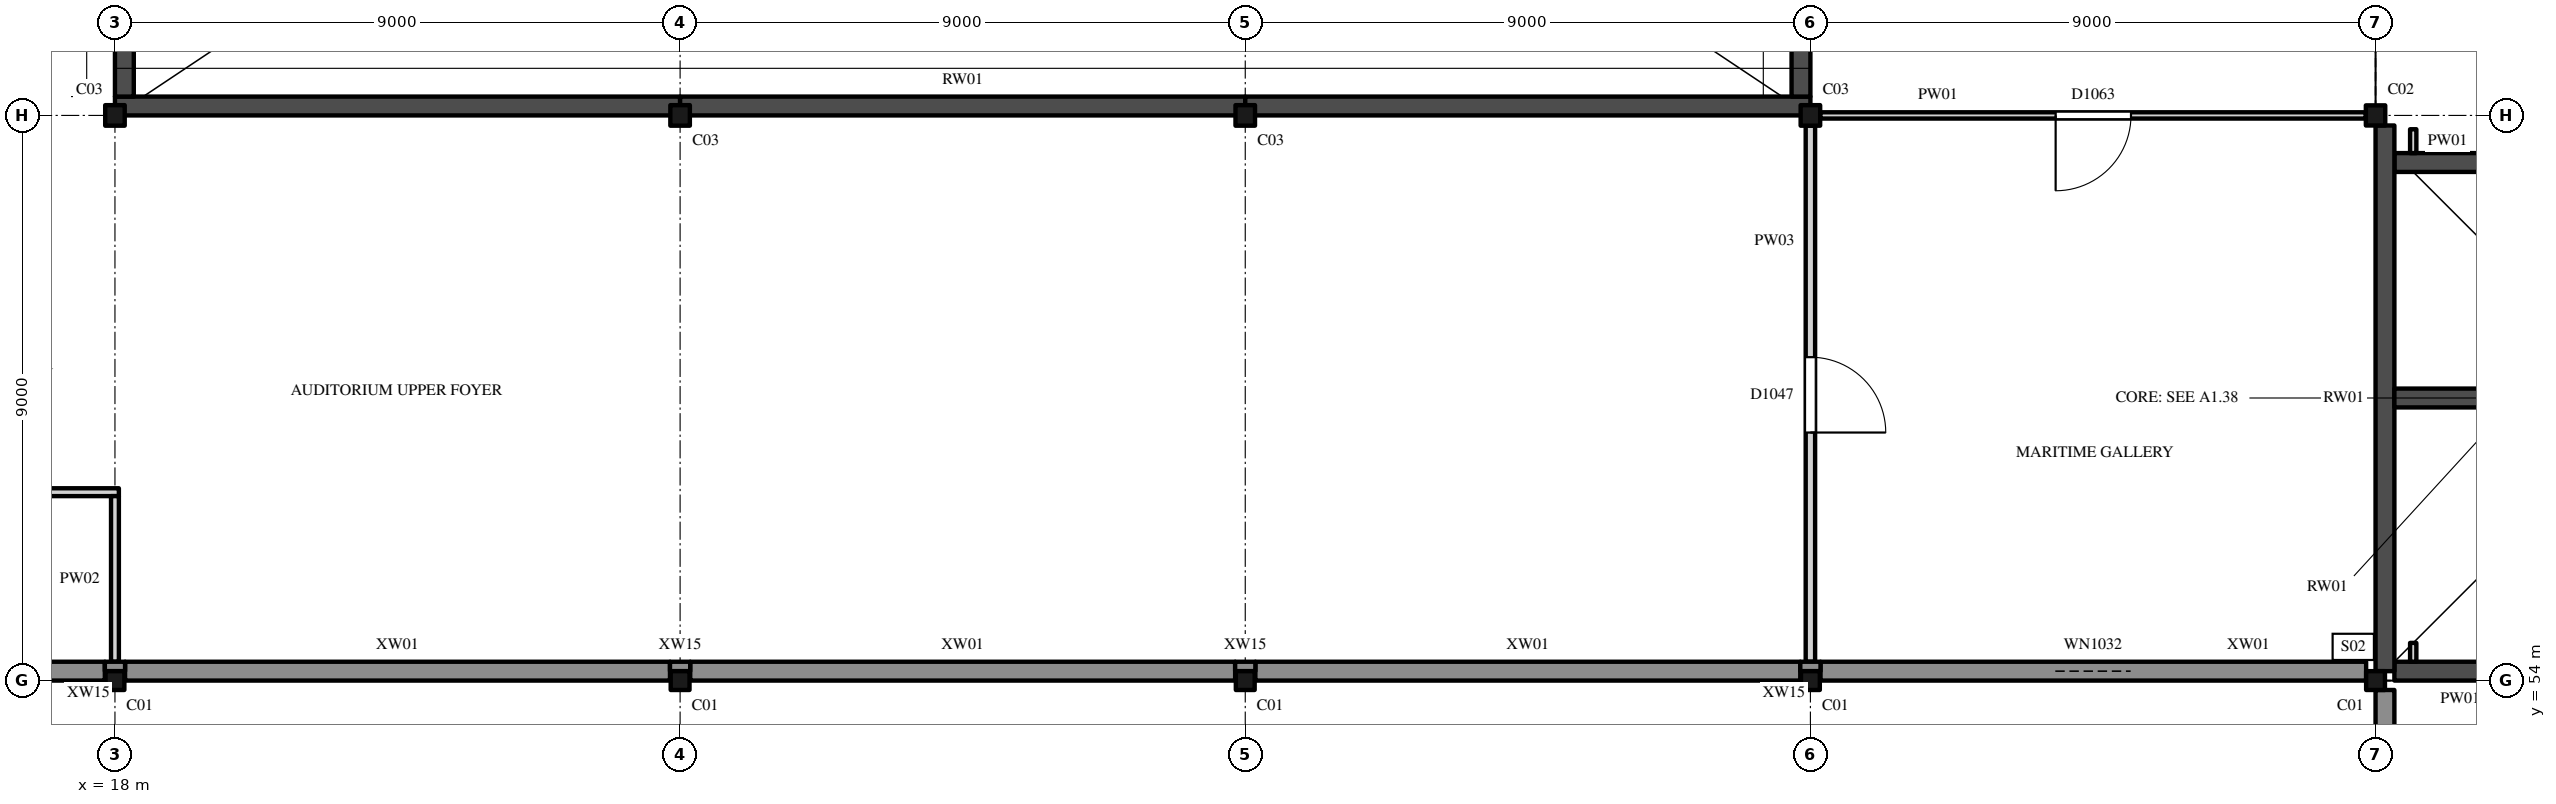
"""IFC4 building model, lengths in metres.
Left out: names, types, materials, properties, quantities, classifications, styles, units other than length and angle.
Written with IfcOpenShell. Run it as: python <this file> out.ifc"""

import sys

from ifc_helpers import new_model, si_unit, direction, frame, frame_2d, origin, origin_2d, place, context, subcontext, project, spatial, rectangle, hollow_rectangle, i_section, extrude, element, fill, save


model = new_model("IFC4")
c1 = context("Model", 3, precision=1e-05, world=origin(), true_north=direction((0.0, 1.0)))
c2 = subcontext(c1, "Body", "Model", "MODEL_VIEW")
j1 = project(units=[si_unit("LENGTHUNIT", "METRE"), si_unit("PLANEANGLEUNIT", "RADIAN")], contexts=[c1])
p1 = place(None, origin())
s1 = spatial("IfcSite", under=j1, at=p1, CompositionType="ELEMENT")
p2 = place(p1, origin())
s2 = spatial("IfcBuilding", under=s1, at=p2, CompositionType="ELEMENT")
p3 = place(p2, frame((0.0, 0.0, 6.0)))
s3 = spatial("IfcBuildingStorey", under=s2, at=p3, CompositionType="ELEMENT", Elevation=6.0)
for number, where, z_axis, x_axis in (
    (1, (18.0, 54.0, 0.0), (0.0, 0.0, 1.0), (1.0, 0.0, 0.0)),
    (2, (27.0, 54.0, 0.0), (0.0, 0.0, 1.0), (1.0, 0.0, 0.0)),
    (3, (36.0, 54.0, 0.0), (0.0, 0.0, 1.0), (1.0, 0.0, 0.0)),
    (4, (45.0, 54.0, 0.0), (0.0, 0.0, 1.0), (1.0, 0.0, 0.0)),
    (5, (54.0, 54.0, 0.0), (0.0, 0.0, 1.0), (1.0, 0.0, 0.0)),
):
    element("IfcColumn", number, at=place(p3, frame(where, z_axis=z_axis, x_axis=x_axis)), inside=s3, PredefinedType="COLUMN", context=c2, shape_type="SweptSolid", body=[
        extrude(hollow_rectangle(XDim=0.3, YDim=0.3, WallThickness=0.012, InnerFilletRadius=0.019, OuterFilletRadius=0.031, at=origin_2d()), origin(), (0.0, 0.0, 1.0), 5.0),
    ])
for number, where, z_axis, x_axis in (
    (6, (18.0, 63.0, 0.0), (0.0, 0.0, 1.0), (1.0, 0.0, 0.0)),
    (7, (27.0, 63.0, 0.0), (0.0, 0.0, 1.0), (1.0, 0.0, 0.0)),
    (8, (36.0, 63.0, 0.0), (0.0, 0.0, 1.0), (1.0, 0.0, 0.0)),
    (9, (45.0, 63.0, 0.0), (0.0, 0.0, 1.0), (1.0, 0.0, 0.0)),
):
    element("IfcColumn", number, at=place(p3, frame(where, z_axis=z_axis, x_axis=x_axis)), inside=s3, PredefinedType="COLUMN", context=c2, shape_type="SweptSolid", body=[
        extrude(i_section(OverallWidth=0.311, OverallDepth=0.327, WebThickness=0.016, FlangeThickness=0.025, FilletRadius=0.017, at=origin_2d()), origin(), (0.0, 0.0, 1.0), 5.0),
    ])
p4 = place(p3, frame((54.0, 63.0, 0.0), z_axis=(0.0, 0.0, 1.0), x_axis=(1.0, 0.0, 0.0)))
e10 = element("IfcColumn", 10, at=p4, inside=s3, PredefinedType="COLUMN", context=c2, shape_type="SweptSolid", body=[
    extrude(i_section(OverallWidth=0.309, OverallDepth=0.321, WebThickness=0.014, FlangeThickness=0.022, FilletRadius=0.017, at=origin_2d()), origin(), (0.0, 0.0, 1.0), 5.0),
])
p5 = place(p3, frame((54.3, 54.15, 0.0), z_axis=(0.0, 0.0, 1.0), x_axis=(1.0, 0.0, 0.0)))
e11 = element("IfcWall", 11, at=p5, inside=s3, PredefinedType="SHEAR", context=c2, shape_type="SweptSolid", body=[
    extrude(rectangle(XDim=8.545, YDim=0.3, at=frame_2d((4.273, 0.0))), origin(), (0.0, 0.0, 1.0), 5.0),
])
p6 = place(p3, frame((54.3, 62.25, 0.0), z_axis=(0.0, 0.0, 1.0), x_axis=(1.0, 0.0, 0.0)))
e12 = element("IfcWall", 12, at=p6, inside=s3, PredefinedType="SHEAR", context=c2, shape_type="SweptSolid", body=[
    extrude(rectangle(XDim=8.1, YDim=0.3, at=frame_2d((4.05, 0.0))), origin(), (0.0, 0.0, 1.0), 5.0),
])
p7 = place(p3, frame((54.15, 54.15, 0.0), z_axis=(0.0, 0.0, 1.0), x_axis=(0.0, 1.0, 0.0)))
e13 = element("IfcWall", 13, at=p7, inside=s3, PredefinedType="SHEAR", context=c2, shape_type="SweptSolid", body=[
    extrude(rectangle(XDim=8.69, YDim=0.3, at=frame_2d((4.345, 0.0))), origin(), (0.0, 0.0, 1.0), 5.0),
])
p8 = place(p3, frame((58.2, 58.5, 0.0), z_axis=(0.0, 0.0, 1.0), x_axis=(-1.0, 0.0, 0.0)))
e14 = element("IfcWall", 14, at=p8, inside=s3, PredefinedType="SHEAR", context=c2, shape_type="SweptSolid", body=[
    extrude(rectangle(XDim=3.9, YDim=0.3, at=frame_2d((1.95, 0.0))), origin(), (0.0, 0.0, 1.0), 5.0),
])
for number, where, z_axis, x_axis in (
    (15, (18.0, 63.15, 0.0), (0.0, 0.0, 1.0), (1.0, 0.0, 0.0)),
    (16, (27.0, 63.15, 0.0), (0.0, 0.0, 1.0), (1.0, 0.0, 0.0)),
    (17, (36.0, 63.15, 0.0), (0.0, 0.0, 1.0), (1.0, 0.0, 0.0)),
):
    element("IfcWall", number, at=place(p3, frame(where, z_axis=z_axis, x_axis=x_axis)), inside=s3, PredefinedType="SHEAR", context=c2, shape_type="SweptSolid", body=[
        extrude(rectangle(XDim=9.0, YDim=0.3, at=frame_2d((4.5, 0.0))), origin(), (0.0, 0.0, 1.0), 4.825),
    ])
p9 = place(p3, frame((18.15, 63.3, 0.0), z_axis=(0.0, 0.0, 1.0), x_axis=(0.0, 1.0, 0.0)))
e18 = element("IfcWall", 18, at=p9, inside=s3, PredefinedType="SHEAR", context=c2, shape_type="SweptSolid", body=[
    extrude(rectangle(XDim=8.7, YDim=0.3, at=frame_2d((4.35, 0.0))), origin(), (0.0, 0.0, 1.0), 4.825),
])
p10 = place(p3, frame((44.85, 63.3, 0.0), z_axis=(0.0, 0.0, 1.0), x_axis=(0.0, 1.0, 0.0)))
e19 = element("IfcWall", 19, at=p10, inside=s3, PredefinedType="SHEAR", context=c2, shape_type="SweptSolid", body=[
    extrude(rectangle(XDim=8.7, YDim=0.3, at=frame_2d((4.35, 0.0))), origin(), (0.0, 0.0, 1.0), 4.825),
])
p11 = place(p10, frame((3.7, 0.0, 0.0)))
e20 = element("IfcOpeningElement", 20, at=p11, cuts=e19, PredefinedType="OPENING", context=c2, shape_type="SweptSolid", body=[
    extrude(rectangle(XDim=1.0, YDim=2.1, at=frame_2d((0.5, 1.05))), frame((0.0, 0.16, 0.0), z_axis=(0.0, -1.0, 0.0), x_axis=(1.0, 0.0, 0.0)), (0.0, 0.0, 1.0), 0.32),
])
p12 = place(p3, frame((54.15, 45.161, 0.0), z_axis=(0.0, 0.0, 1.0), x_axis=(0.0, 1.0, 0.0)))
e21 = element("IfcWall", 21, at=p12, inside=s3, PredefinedType="SOLIDWALL", context=c2, shape_type="SweptSolid", body=[
    extrude(rectangle(XDim=8.689, YDim=0.3, at=frame_2d((4.345, 0.0))), origin(), (0.0, 0.0, 1.0), 4.297),
])
p13 = place(p12, frame((1.489, 0.0, 1.2)))
e22 = element("IfcOpeningElement", 22, at=p13, cuts=e21, PredefinedType="OPENING", context=c2, shape_type="SweptSolid", body=[
    extrude(rectangle(XDim=1.2, YDim=1.5, at=frame_2d((0.6, 0.75))), frame((0.0, 0.16, 0.0), z_axis=(0.0, -1.0, 0.0), x_axis=(1.0, 0.0, 0.0)), (0.0, 0.0, 1.0), 0.32),
])
p14 = place(p12, frame((5.989, 0.0, 1.2)))
e23 = element("IfcOpeningElement", 23, at=p14, cuts=e21, PredefinedType="OPENING", context=c2, shape_type="SweptSolid", body=[
    extrude(rectangle(XDim=1.2, YDim=1.5, at=frame_2d((0.6, 0.75))), frame((0.0, 0.16, 0.0), z_axis=(0.0, -1.0, 0.0), x_axis=(1.0, 0.0, 0.0)), (0.0, 0.0, 1.0), 0.32),
])
p15 = place(p3, frame((9.172, 54.15, 0.0), z_axis=(0.0, 0.0, 1.0), x_axis=(1.0, 0.0, 0.0)))
e24 = element("IfcWall", 24, at=p15, inside=s3, PredefinedType="SOLIDWALL", context=c2, shape_type="SweptSolid", body=[
    extrude(rectangle(XDim=8.667, YDim=0.3, at=frame_2d((4.333, 0.0))), origin(), (0.0, 0.0, 1.0), 4.469),
])
for number, where, z_axis, x_axis in (
    (25, (18.161, 54.15, 0.0), (0.0, 0.0, 1.0), (1.0, 0.0, 0.0)),
    (26, (27.161, 54.15, 0.0), (0.0, 0.0, 1.0), (1.0, 0.0, 0.0)),
    (27, (36.161, 54.15, 0.0), (0.0, 0.0, 1.0), (1.0, 0.0, 0.0)),
):
    element("IfcWall", number, at=place(p3, frame(where, z_axis=z_axis, x_axis=x_axis)), inside=s3, PredefinedType="SOLIDWALL", context=c2, shape_type="SweptSolid", body=[
        extrude(rectangle(XDim=8.678, YDim=0.3, at=frame_2d((4.339, 0.0))), origin(), (0.0, 0.0, 1.0), 4.469),
    ])
p16 = place(p3, frame((45.161, 54.15, 0.0), z_axis=(0.0, 0.0, 1.0), x_axis=(1.0, 0.0, 0.0)))
e28 = element("IfcWall", 28, at=p16, inside=s3, PredefinedType="SOLIDWALL", context=c2, shape_type="SweptSolid", body=[
    extrude(rectangle(XDim=8.689, YDim=0.3, at=frame_2d((4.345, 0.0))), origin(), (0.0, 0.0, 1.0), 4.469),
])
p17 = place(p16, frame((3.739, 0.0, 1.0)))
e29 = element("IfcOpeningElement", 29, at=p17, cuts=e28, PredefinedType="OPENING", context=c2, shape_type="SweptSolid", body=[
    extrude(rectangle(XDim=1.2, YDim=3.0, at=frame_2d((0.6, 1.5))), frame((0.0, 0.16, 0.0), z_axis=(0.0, -1.0, 0.0), x_axis=(1.0, 0.0, 0.0)), (0.0, 0.0, 1.0), 0.32),
])
for number, where, z_axis, x_axis in (
    (30, (17.839, 54.225, 0.0), (0.0, 0.0, 1.0), (1.0, 0.0, 0.0)),
    (31, (26.839, 54.225, 0.0), (0.0, 0.0, 1.0), (1.0, 0.0, 0.0)),
    (32, (35.839, 54.225, 0.0), (0.0, 0.0, 1.0), (1.0, 0.0, 0.0)),
    (33, (44.839, 54.225, 0.0), (0.0, 0.0, 1.0), (1.0, 0.0, 0.0)),
):
    element("IfcWall", number, at=place(p3, frame(where, z_axis=z_axis, x_axis=x_axis)), inside=s3, PredefinedType="SOLIDWALL", context=c2, shape_type="SweptSolid", body=[
        extrude(rectangle(XDim=0.322, YDim=0.15, at=frame_2d((0.161, 0.0))), origin(), (0.0, 0.0, 1.0), 4.469),
    ])
p18 = place(p3, frame((8.4, 57.0, 0.0), z_axis=(0.0, 0.0, 1.0), x_axis=(1.0, 0.0, 0.0)))
e34 = element("IfcWall", 34, at=p18, inside=s3, PredefinedType="PARTITIONING", context=c2, shape_type="SweptSolid", body=[
    extrude(rectangle(XDim=9.663, YDim=0.125, at=frame_2d((4.831, 0.0))), origin(), (0.0, 0.0, 1.0), 4.469),
])
p19 = place(p18, frame((1.95, 0.0, 0.0)))
e35 = element("IfcOpeningElement", 35, at=p19, cuts=e34, PredefinedType="OPENING", context=c2, shape_type="SweptSolid", body=[
    extrude(rectangle(XDim=0.9, YDim=2.1, at=frame_2d((0.45, 1.05))), frame((0.0, 0.073, 0.0), z_axis=(0.0, -1.0, 0.0), x_axis=(1.0, 0.0, 0.0)), (0.0, 0.0, 1.0), 0.145),
])
p20 = place(p18, frame((6.45, 0.0, 0.0)))
e36 = element("IfcOpeningElement", 36, at=p20, cuts=e34, PredefinedType="OPENING", context=c2, shape_type="SweptSolid", body=[
    extrude(rectangle(XDim=0.9, YDim=2.1, at=frame_2d((0.45, 1.05))), frame((0.0, 0.073, 0.0), z_axis=(0.0, -1.0, 0.0), x_axis=(1.0, 0.0, 0.0)), (0.0, 0.0, 1.0), 0.145),
])
p21 = place(p3, frame((45.156, 63.0, 0.0), z_axis=(0.0, 0.0, 1.0), x_axis=(1.0, 0.0, 0.0)))
e37 = element("IfcWall", 37, at=p21, inside=s3, PredefinedType="PARTITIONING", context=c2, shape_type="SweptSolid", body=[
    extrude(rectangle(XDim=8.69, YDim=0.1, at=frame_2d((4.345, 0.0))), origin(), (0.0, 0.0, 1.0), 4.469),
])
p22 = place(p21, frame((3.75, 0.0, 0.0)))
e38 = element("IfcOpeningElement", 38, at=p22, cuts=e37, PredefinedType="OPENING", context=c2, shape_type="SweptSolid", body=[
    extrude(rectangle(XDim=1.2, YDim=2.4, at=frame_2d((0.6, 1.2))), frame((0.0, 0.06, 0.0), z_axis=(0.0, -1.0, 0.0), x_axis=(1.0, 0.0, 0.0)), (0.0, 0.0, 1.0), 0.12),
])
p23 = place(p3, frame((18.0, 54.3, 0.0), z_axis=(0.0, 0.0, 1.0), x_axis=(0.0, 1.0, 0.0)))
e39 = element("IfcWall", 39, at=p23, inside=s3, PredefinedType="PARTITIONING", context=c2, shape_type="SweptSolid", body=[
    extrude(rectangle(XDim=2.637, YDim=0.125, at=frame_2d((1.319, 0.0))), origin(), (0.0, 0.0, 1.0), 4.365),
])
p24 = place(p3, frame((45.0, 54.3, 0.0), z_axis=(0.0, 0.0, 1.0), x_axis=(0.0, 1.0, 0.0)))
e40 = element("IfcWall", 40, at=p24, inside=s3, PredefinedType="PARTITIONING", context=c2, shape_type="SweptSolid", body=[
    extrude(rectangle(XDim=8.536, YDim=0.15, at=frame_2d((4.268, 0.0))), origin(), (0.0, 0.0, 1.0), 4.365),
])
p25 = place(p24, frame((3.65, 0.0, 0.0)))
e41 = element("IfcOpeningElement", 41, at=p25, cuts=e40, PredefinedType="OPENING", context=c2, shape_type="SweptSolid", body=[
    extrude(rectangle(XDim=1.2, YDim=2.4, at=frame_2d((0.6, 1.2))), frame((0.0, 0.085, 0.0), z_axis=(0.0, -1.0, 0.0), x_axis=(1.0, 0.0, 0.0)), (0.0, 0.0, 1.0), 0.17),
])
p26 = place(p3, frame((54.6, 54.3, 0.0), z_axis=(0.0, 0.0, 1.0), x_axis=(0.0, 1.0, 0.0)))
e42 = element("IfcWall", 42, at=p26, inside=s3, PredefinedType="PARTITIONING", context=c2, shape_type="SweptSolid", body=[
    extrude(rectangle(XDim=0.3, YDim=0.1, at=frame_2d((0.15, 0.0))), origin(), (0.0, 0.0, 1.0), 4.825),
])
p27 = place(p3, frame((54.6, 62.4, 0.0), z_axis=(0.0, 0.0, 1.0), x_axis=(0.0, 1.0, 0.0)))
e43 = element("IfcWall", 43, at=p27, inside=s3, PredefinedType="PARTITIONING", context=c2, shape_type="SweptSolid", body=[
    extrude(rectangle(XDim=0.38, YDim=0.1, at=frame_2d((0.19, 0.0))), origin(), (0.0, 0.0, 1.0), 4.825),
])
p28 = place(p17, origin())
e44 = element("IfcWindow", 44, at=p28, inside=s3, PartitioningType="SINGLE_PANEL", PredefinedType="WINDOW", context=c2, shape_type="SweptSolid", body=[
    extrude(rectangle(XDim=1.2, YDim=3.0, at=frame_2d((0.6, 1.5))), frame((0.0, 0.03, 0.0), z_axis=(0.0, -1.0, 0.0), x_axis=(1.0, 0.0, 0.0)), (0.0, 0.0, 1.0), 0.06),
])
fill(e29, e44)
p29 = place(p25, origin())
e45 = element("IfcDoor", 45, at=p29, inside=s3, OperationType="SINGLE_SWING_LEFT", PredefinedType="DOOR", context=c2, shape_type="SweptSolid", body=[
    extrude(rectangle(XDim=1.2, YDim=2.4, at=frame_2d((0.6, 1.2))), frame((0.0, 0.025, 0.0), z_axis=(0.0, -1.0, 0.0), x_axis=(1.0, 0.0, 0.0)), (0.0, 0.0, 1.0), 0.05),
])
fill(e41, e45)
p30 = place(p22, origin())
e46 = element("IfcDoor", 46, at=p30, inside=s3, OperationType="SINGLE_SWING_LEFT", PredefinedType="DOOR", context=c2, shape_type="SweptSolid", body=[
    extrude(rectangle(XDim=1.2, YDim=2.4, at=frame_2d((0.6, 1.2))), frame((0.0, 0.025, 0.0), z_axis=(0.0, -1.0, 0.0), x_axis=(1.0, 0.0, 0.0)), (0.0, 0.0, 1.0), 0.05),
])
fill(e38, e46)
save(model, sys.argv[1])
